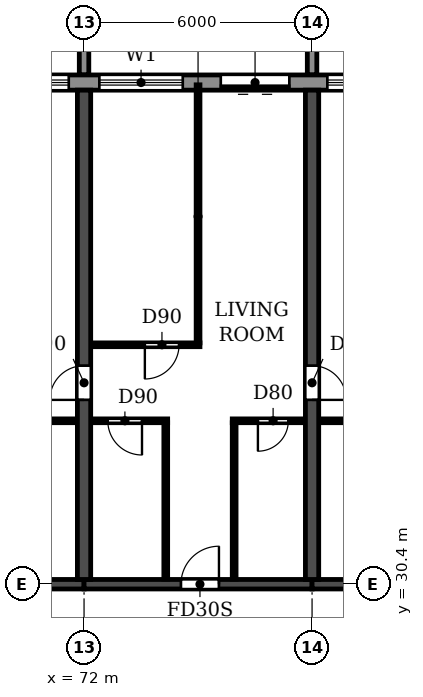
"""IFC4 building model, lengths in metres.
Left out: names, types, materials, properties, quantities, classifications, styles, units other than length and angle.
Written with IfcOpenShell. Run it as: python <this file> out.ifc"""

import sys

from ifc_helpers import new_model, si_unit, direction, frame, frame_2d, origin, place, context, subcontext, project, spatial, polyline, rectangle, outline, extrude, source, transform, mapped, element, fill, save


model = new_model("IFC4")
c1 = context("Model", 3, precision=1e-05, world=origin(), true_north=direction((0.0, 1.0)))
c2 = subcontext(c1, "Body", "Model", "MODEL_VIEW")
j1 = project(units=[si_unit("LENGTHUNIT", "METRE"), si_unit("PLANEANGLEUNIT", "RADIAN")], contexts=[c1])
p1 = place(None, origin())
s1 = spatial("IfcSite", under=j1, at=p1, CompositionType="ELEMENT")
p2 = place(p1, origin())
s2 = spatial("IfcBuilding", under=s1, at=p2, CompositionType="ELEMENT")
p3 = place(p2, frame((0.0, 0.0, 82.8)))
s3 = spatial("IfcBuildingStorey", under=s2, at=p3, CompositionType="ELEMENT", Elevation=82.8)
p4 = place(p3, frame((72.0, 30.525, 0.0), z_axis=(0.0, 0.0, 1.0), x_axis=(0.0, 1.0, 0.0)))
e1 = element("IfcWall", 1, at=p4, inside=s3, PredefinedType="SHEAR", context=c2, shape_type="SweptSolid", body=[
    extrude(rectangle(XDim=12.875, YDim=0.35, at=frame_2d((6.438, 0.0))), origin(), (0.0, 0.0, 1.0), 3.06),
])
p5 = place(p4, frame((4.725, 0.0, 0.0)))
e2 = element("IfcOpeningElement", 2, at=p5, cuts=e1, PredefinedType="OPENING", context=c2, shape_type="SweptSolid", body=[
    extrude(rectangle(XDim=0.9, YDim=2.1, at=frame_2d((0.45, 1.05))), frame((0.0, 0.185, 0.0), z_axis=(0.0, -1.0, 0.0), x_axis=(1.0, 0.0, 0.0)), (0.0, 0.0, 1.0), 0.37),
])
p6 = place(p3, frame((78.0, 30.525, 0.0), z_axis=(0.0, 0.0, 1.0), x_axis=(0.0, 1.0, 0.0)))
e3 = element("IfcWall", 3, at=p6, inside=s3, PredefinedType="SHEAR", context=c2, shape_type="SweptSolid", body=[
    extrude(rectangle(XDim=12.875, YDim=0.35, at=frame_2d((6.438, 0.0))), origin(), (0.0, 0.0, 1.0), 3.06),
])
p7 = place(p6, frame((4.725, 0.0, 0.0)))
e4 = element("IfcOpeningElement", 4, at=p7, cuts=e3, PredefinedType="OPENING", context=c2, shape_type="SweptSolid", body=[
    extrude(rectangle(XDim=0.9, YDim=2.1, at=frame_2d((0.45, 1.05))), frame((0.0, 0.185, 0.0), z_axis=(0.0, -1.0, 0.0), x_axis=(1.0, 0.0, 0.0)), (0.0, 0.0, 1.0), 0.37),
])
p8 = place(p3, frame((66.0, 30.4, 0.0), z_axis=(0.0, 0.0, 1.0), x_axis=(1.0, 0.0, 0.0)))
e5 = element("IfcWall", 5, at=p8, inside=s3, PredefinedType="SHEAR", context=c2, shape_type="SweptSolid", body=[
    extrude(rectangle(XDim=6.0, YDim=0.25, at=frame_2d((3.0, 0.0))), origin(), (0.0, 0.0, 1.0), 2.46),
])
p9 = place(p3, frame((72.0, 30.4, 0.0), z_axis=(0.0, 0.0, 1.0), x_axis=(1.0, 0.0, 0.0)))
e6 = element("IfcWall", 6, at=p9, inside=s3, PredefinedType="SHEAR", context=c2, shape_type="SweptSolid", body=[
    extrude(rectangle(XDim=6.0, YDim=0.25, at=frame_2d((3.0, 0.0))), origin(), (0.0, 0.0, 1.0), 2.46),
])
p10 = place(p9, frame((2.55, 0.0, 0.0)))
e7 = element("IfcOpeningElement", 7, at=p10, cuts=e6, PredefinedType="OPENING", context=c2, shape_type="SweptSolid", body=[
    extrude(rectangle(XDim=1.0, YDim=2.1, at=frame_2d((0.5, 1.05))), frame((0.0, 0.135, 0.0), z_axis=(0.0, -1.0, 0.0), x_axis=(1.0, 0.0, 0.0)), (0.0, 0.0, 1.0), 0.27),
])
p11 = place(p3, frame((78.0, 30.4, 0.0), z_axis=(0.0, 0.0, 1.0), x_axis=(1.0, 0.0, 0.0)))
e8 = element("IfcWall", 8, at=p11, inside=s3, PredefinedType="SHEAR", context=c2, shape_type="SweptSolid", body=[
    extrude(rectangle(XDim=6.0, YDim=0.25, at=frame_2d((3.0, 0.0))), origin(), (0.0, 0.0, 1.0), 2.46),
])
p12 = place(p3, frame((91.317, 43.6, 0.0), z_axis=(0.0, 0.0, 1.0), x_axis=(-1.0, 0.0, 0.0)))
e9 = element("IfcWall", 9, at=p12, inside=s3, PredefinedType="STANDARD", context=c2, shape_type="SweptSolid", body=[
    extrude(rectangle(XDim=80.634, YDim=0.4, at=frame_2d((40.317, 0.0))), origin(), (0.0, 0.0, 1.0), 3.06),
])
p13 = place(p12, frame((76.717, 0.0, 0.9)))
e10 = element("IfcOpeningElement", 10, at=p13, cuts=e9, PredefinedType="OPENING", context=c2, shape_type="SweptSolid", body=[
    extrude(rectangle(XDim=2.2, YDim=1.5, at=frame_2d((1.1, 0.75))), frame((0.0, 0.21, 0.0), z_axis=(0.0, -1.0, 0.0), x_axis=(1.0, 0.0, 0.0)), (0.0, 0.0, 1.0), 0.42),
])
p14 = place(p12, frame((73.917, 0.0, 0.0)))
e11 = element("IfcOpeningElement", 11, at=p14, cuts=e9, PredefinedType="OPENING", context=c2, shape_type="SweptSolid", body=[
    extrude(rectangle(XDim=1.8, YDim=2.4, at=frame_2d((0.9, 1.2))), frame((0.0, 0.21, 0.0), z_axis=(0.0, -1.0, 0.0), x_axis=(1.0, 0.0, 0.0)), (0.0, 0.0, 1.0), 0.42),
])
p15 = place(p12, frame((70.717, 0.0, 0.9)))
e12 = element("IfcOpeningElement", 12, at=p15, cuts=e9, PredefinedType="OPENING", context=c2, shape_type="SweptSolid", body=[
    extrude(rectangle(XDim=2.2, YDim=1.5, at=frame_2d((1.1, 0.75))), frame((0.0, 0.21, 0.0), z_axis=(0.0, -1.0, 0.0), x_axis=(1.0, 0.0, 0.0)), (0.0, 0.0, 1.0), 0.42),
])
p16 = place(p12, frame((67.717, 0.0, 0.9)))
e13 = element("IfcOpeningElement", 13, at=p16, cuts=e9, PredefinedType="OPENING", context=c2, shape_type="SweptSolid", body=[
    extrude(rectangle(XDim=2.2, YDim=1.5, at=frame_2d((1.1, 0.75))), frame((0.0, 0.21, 0.0), z_axis=(0.0, -1.0, 0.0), x_axis=(1.0, 0.0, 0.0)), (0.0, 0.0, 1.0), 0.42),
])
p17 = place(p12, frame((64.717, 0.0, 0.9)))
e14 = element("IfcOpeningElement", 14, at=p17, cuts=e9, PredefinedType="OPENING", context=c2, shape_type="SweptSolid", body=[
    extrude(rectangle(XDim=2.2, YDim=1.5, at=frame_2d((1.1, 0.75))), frame((0.0, 0.21, 0.0), z_axis=(0.0, -1.0, 0.0), x_axis=(1.0, 0.0, 0.0)), (0.0, 0.0, 1.0), 0.42),
])
p18 = place(p12, frame((61.917, 0.0, 0.0)))
e15 = element("IfcOpeningElement", 15, at=p18, cuts=e9, PredefinedType="OPENING", context=c2, shape_type="SweptSolid", body=[
    extrude(rectangle(XDim=1.8, YDim=2.4, at=frame_2d((0.9, 1.2))), frame((0.0, 0.21, 0.0), z_axis=(0.0, -1.0, 0.0), x_axis=(1.0, 0.0, 0.0)), (0.0, 0.0, 1.0), 0.42),
])
p19 = place(p12, frame((58.917, 0.0, 0.0)))
e16 = element("IfcOpeningElement", 16, at=p19, cuts=e9, PredefinedType="OPENING", context=c2, shape_type="SweptSolid", body=[
    extrude(rectangle(XDim=1.8, YDim=2.4, at=frame_2d((0.9, 1.2))), frame((0.0, 0.21, 0.0), z_axis=(0.0, -1.0, 0.0), x_axis=(1.0, 0.0, 0.0)), (0.0, 0.0, 1.0), 0.42),
])
p20 = place(p12, frame((55.717, 0.0, 0.9)))
e17 = element("IfcOpeningElement", 17, at=p20, cuts=e9, PredefinedType="OPENING", context=c2, shape_type="SweptSolid", body=[
    extrude(rectangle(XDim=2.2, YDim=1.5, at=frame_2d((1.1, 0.75))), frame((0.0, 0.21, 0.0), z_axis=(0.0, -1.0, 0.0), x_axis=(1.0, 0.0, 0.0)), (0.0, 0.0, 1.0), 0.42),
])
p21 = place(p12, frame((52.717, 0.0, 0.9)))
e18 = element("IfcOpeningElement", 18, at=p21, cuts=e9, PredefinedType="OPENING", context=c2, shape_type="SweptSolid", body=[
    extrude(rectangle(XDim=2.2, YDim=1.5, at=frame_2d((1.1, 0.75))), frame((0.0, 0.21, 0.0), z_axis=(0.0, -1.0, 0.0), x_axis=(1.0, 0.0, 0.0)), (0.0, 0.0, 1.0), 0.42),
])
p22 = place(p12, frame((49.917, 0.0, 0.0)))
e19 = element("IfcOpeningElement", 19, at=p22, cuts=e9, PredefinedType="OPENING", context=c2, shape_type="SweptSolid", body=[
    extrude(rectangle(XDim=1.8, YDim=2.4, at=frame_2d((0.9, 1.2))), frame((0.0, 0.21, 0.0), z_axis=(0.0, -1.0, 0.0), x_axis=(1.0, 0.0, 0.0)), (0.0, 0.0, 1.0), 0.42),
])
p23 = place(p12, frame((46.717, 0.0, 0.9)))
e20 = element("IfcOpeningElement", 20, at=p23, cuts=e9, PredefinedType="OPENING", context=c2, shape_type="SweptSolid", body=[
    extrude(rectangle(XDim=2.2, YDim=1.5, at=frame_2d((1.1, 0.75))), frame((0.0, 0.21, 0.0), z_axis=(0.0, -1.0, 0.0), x_axis=(1.0, 0.0, 0.0)), (0.0, 0.0, 1.0), 0.42),
])
p24 = place(p12, frame((43.717, 0.0, 0.9)))
e21 = element("IfcOpeningElement", 21, at=p24, cuts=e9, PredefinedType="OPENING", context=c2, shape_type="SweptSolid", body=[
    extrude(rectangle(XDim=2.2, YDim=1.5, at=frame_2d((1.1, 0.75))), frame((0.0, 0.21, 0.0), z_axis=(0.0, -1.0, 0.0), x_axis=(1.0, 0.0, 0.0)), (0.0, 0.0, 1.0), 0.42),
])
p25 = place(p12, frame((40.717, 0.0, 0.9)))
e22 = element("IfcOpeningElement", 22, at=p25, cuts=e9, PredefinedType="OPENING", context=c2, shape_type="SweptSolid", body=[
    extrude(rectangle(XDim=2.2, YDim=1.5, at=frame_2d((1.1, 0.75))), frame((0.0, 0.21, 0.0), z_axis=(0.0, -1.0, 0.0), x_axis=(1.0, 0.0, 0.0)), (0.0, 0.0, 1.0), 0.42),
])
p26 = place(p12, frame((37.917, 0.0, 0.0)))
e23 = element("IfcOpeningElement", 23, at=p26, cuts=e9, PredefinedType="OPENING", context=c2, shape_type="SweptSolid", body=[
    extrude(rectangle(XDim=1.8, YDim=2.4, at=frame_2d((0.9, 1.2))), frame((0.0, 0.21, 0.0), z_axis=(0.0, -1.0, 0.0), x_axis=(1.0, 0.0, 0.0)), (0.0, 0.0, 1.0), 0.42),
])
p27 = place(p12, frame((34.717, 0.0, 0.9)))
e24 = element("IfcOpeningElement", 24, at=p27, cuts=e9, PredefinedType="OPENING", context=c2, shape_type="SweptSolid", body=[
    extrude(rectangle(XDim=2.2, YDim=1.5, at=frame_2d((1.1, 0.75))), frame((0.0, 0.21, 0.0), z_axis=(0.0, -1.0, 0.0), x_axis=(1.0, 0.0, 0.0)), (0.0, 0.0, 1.0), 0.42),
])
p28 = place(p12, frame((31.717, 0.0, 0.9)))
e25 = element("IfcOpeningElement", 25, at=p28, cuts=e9, PredefinedType="OPENING", context=c2, shape_type="SweptSolid", body=[
    extrude(rectangle(XDim=2.2, YDim=1.5, at=frame_2d((1.1, 0.75))), frame((0.0, 0.21, 0.0), z_axis=(0.0, -1.0, 0.0), x_axis=(1.0, 0.0, 0.0)), (0.0, 0.0, 1.0), 0.42),
])
p29 = place(p12, frame((28.917, 0.0, 0.0)))
e26 = element("IfcOpeningElement", 26, at=p29, cuts=e9, PredefinedType="OPENING", context=c2, shape_type="SweptSolid", body=[
    extrude(rectangle(XDim=1.8, YDim=2.4, at=frame_2d((0.9, 1.2))), frame((0.0, 0.21, 0.0), z_axis=(0.0, -1.0, 0.0), x_axis=(1.0, 0.0, 0.0)), (0.0, 0.0, 1.0), 0.42),
])
p30 = place(p12, frame((25.717, 0.0, 0.9)))
e27 = element("IfcOpeningElement", 27, at=p30, cuts=e9, PredefinedType="OPENING", context=c2, shape_type="SweptSolid", body=[
    extrude(rectangle(XDim=2.2, YDim=1.5, at=frame_2d((1.1, 0.75))), frame((0.0, 0.21, 0.0), z_axis=(0.0, -1.0, 0.0), x_axis=(1.0, 0.0, 0.0)), (0.0, 0.0, 1.0), 0.42),
])
p31 = place(p12, frame((22.717, 0.0, 0.9)))
e28 = element("IfcOpeningElement", 28, at=p31, cuts=e9, PredefinedType="OPENING", context=c2, shape_type="SweptSolid", body=[
    extrude(rectangle(XDim=2.2, YDim=1.5, at=frame_2d((1.1, 0.75))), frame((0.0, 0.21, 0.0), z_axis=(0.0, -1.0, 0.0), x_axis=(1.0, 0.0, 0.0)), (0.0, 0.0, 1.0), 0.42),
])
p32 = place(p12, frame((19.717, 0.0, 0.9)))
e29 = element("IfcOpeningElement", 29, at=p32, cuts=e9, PredefinedType="OPENING", context=c2, shape_type="SweptSolid", body=[
    extrude(rectangle(XDim=2.2, YDim=1.5, at=frame_2d((1.1, 0.75))), frame((0.0, 0.21, 0.0), z_axis=(0.0, -1.0, 0.0), x_axis=(1.0, 0.0, 0.0)), (0.0, 0.0, 1.0), 0.42),
])
p33 = place(p12, frame((16.717, 0.0, 0.9)))
e30 = element("IfcOpeningElement", 30, at=p33, cuts=e9, PredefinedType="OPENING", context=c2, shape_type="SweptSolid", body=[
    extrude(rectangle(XDim=2.2, YDim=1.5, at=frame_2d((1.1, 0.75))), frame((0.0, 0.21, 0.0), z_axis=(0.0, -1.0, 0.0), x_axis=(1.0, 0.0, 0.0)), (0.0, 0.0, 1.0), 0.42),
])
p34 = place(p12, frame((13.917, 0.0, 0.0)))
e31 = element("IfcOpeningElement", 31, at=p34, cuts=e9, PredefinedType="OPENING", context=c2, shape_type="SweptSolid", body=[
    extrude(rectangle(XDim=1.8, YDim=2.4, at=frame_2d((0.9, 1.2))), frame((0.0, 0.21, 0.0), z_axis=(0.0, -1.0, 0.0), x_axis=(1.0, 0.0, 0.0)), (0.0, 0.0, 1.0), 0.42),
])
p35 = place(p12, frame((10.717, 0.0, 0.9)))
e32 = element("IfcOpeningElement", 32, at=p35, cuts=e9, PredefinedType="OPENING", context=c2, shape_type="SweptSolid", body=[
    extrude(rectangle(XDim=2.2, YDim=1.5, at=frame_2d((1.1, 0.75))), frame((0.0, 0.21, 0.0), z_axis=(0.0, -1.0, 0.0), x_axis=(1.0, 0.0, 0.0)), (0.0, 0.0, 1.0), 0.42),
])
p36 = place(p12, frame((7.717, 0.0, 0.9)))
e33 = element("IfcOpeningElement", 33, at=p36, cuts=e9, PredefinedType="OPENING", context=c2, shape_type="SweptSolid", body=[
    extrude(rectangle(XDim=2.2, YDim=1.5, at=frame_2d((1.1, 0.75))), frame((0.0, 0.21, 0.0), z_axis=(0.0, -1.0, 0.0), x_axis=(1.0, 0.0, 0.0)), (0.0, 0.0, 1.0), 0.42),
])
p37 = place(p12, frame((4.917, 0.0, 0.0)))
e34 = element("IfcOpeningElement", 34, at=p37, cuts=e9, PredefinedType="OPENING", context=c2, shape_type="SweptSolid", body=[
    extrude(rectangle(XDim=1.8, YDim=2.4, at=frame_2d((0.9, 1.2))), frame((0.0, 0.21, 0.0), z_axis=(0.0, -1.0, 0.0), x_axis=(1.0, 0.0, 0.0)), (0.0, 0.0, 1.0), 0.42),
])
p38 = place(p12, frame((1.717, 0.0, 0.9)))
e35 = element("IfcOpeningElement", 35, at=p38, cuts=e9, PredefinedType="OPENING", context=c2, shape_type="SweptSolid", body=[
    extrude(rectangle(XDim=2.2, YDim=1.5, at=frame_2d((1.1, 0.75))), frame((0.0, 0.21, 0.0), z_axis=(0.0, -1.0, 0.0), x_axis=(1.0, 0.0, 0.0)), (0.0, 0.0, 1.0), 0.42),
])
m1 = source(origin(), c2, "Body", "SweptSolid", [
    extrude(outline(polyline([(0.0, 0.0), (0.25, 0.0), (0.25, 3.1), (0.0, 3.1), (0.0, 0.0)])), origin(), (0.0, 0.0, 1.0), 3.1),
])
for number, where in (
    (36, (71.875, 43.8, 0.0)),
    (37, (77.875, 43.8, 0.0)),
):
    element("IfcWall", number, at=place(p3, frame(where)), inside=s3, PredefinedType="STANDARD", context=c2, shape_type="MappedRepresentation", body=[
        mapped(m1, transform((0.0, 0.0, 0.0))),
    ])
p39 = place(p3, frame((68.9, 34.7, 0.0), z_axis=(0.0, 0.0, 1.0), x_axis=(1.0, 0.0, 0.0)))
e38 = element("IfcWall", 38, at=p39, inside=s3, PredefinedType="PARTITIONING", context=c2, shape_type="SweptSolid", body=[
    extrude(rectangle(XDim=2.915, YDim=0.1, at=frame_2d((1.458, 0.0))), origin(), (0.0, 0.0, 1.0), 3.06),
])
p40 = place(p39, frame((1.2, 0.0, 0.0)))
e39 = element("IfcOpeningElement", 39, at=p40, cuts=e38, PredefinedType="OPENING", context=c2, shape_type="SweptSolid", body=[
    extrude(rectangle(XDim=0.8, YDim=2.1, at=frame_2d((0.4, 1.05))), frame((0.0, 0.06, 0.0), z_axis=(0.0, -1.0, 0.0), x_axis=(1.0, 0.0, 0.0)), (0.0, 0.0, 1.0), 0.12),
])
p41 = place(p3, frame((72.185, 34.7, 0.0), z_axis=(0.0, 0.0, 1.0), x_axis=(1.0, 0.0, 0.0)))
e40 = element("IfcWall", 40, at=p41, inside=s3, PredefinedType="PARTITIONING", context=c2, shape_type="SweptSolid", body=[
    extrude(rectangle(XDim=2.015, YDim=0.1, at=frame_2d((1.007, 0.0))), origin(), (0.0, 0.0, 1.0), 3.06),
])
p42 = place(p41, frame((0.44, 0.0, 0.0)))
e41 = element("IfcOpeningElement", 41, at=p42, cuts=e40, PredefinedType="OPENING", context=c2, shape_type="SweptSolid", body=[
    extrude(rectangle(XDim=0.9, YDim=2.1, at=frame_2d((0.45, 1.05))), frame((0.0, 0.06, 0.0), z_axis=(0.0, -1.0, 0.0), x_axis=(1.0, 0.0, 0.0)), (0.0, 0.0, 1.0), 0.12),
])
p43 = place(p3, frame((75.9, 34.7, 0.0), z_axis=(0.0, 0.0, 1.0), x_axis=(1.0, 0.0, 0.0)))
e42 = element("IfcWall", 42, at=p43, inside=s3, PredefinedType="PARTITIONING", context=c2, shape_type="SweptSolid", body=[
    extrude(rectangle(XDim=1.915, YDim=0.1, at=frame_2d((0.958, 0.0))), origin(), (0.0, 0.0, 1.0), 3.06),
])
p44 = place(p43, frame((0.675, 0.0, 0.0)))
e43 = element("IfcOpeningElement", 43, at=p44, cuts=e42, PredefinedType="OPENING", context=c2, shape_type="SweptSolid", body=[
    extrude(rectangle(XDim=0.8, YDim=2.1, at=frame_2d((0.4, 1.05))), frame((0.0, 0.06, 0.0), z_axis=(0.0, -1.0, 0.0), x_axis=(1.0, 0.0, 0.0)), (0.0, 0.0, 1.0), 0.12),
])
p45 = place(p3, frame((78.185, 34.7, 0.0), z_axis=(0.0, 0.0, 1.0), x_axis=(1.0, 0.0, 0.0)))
e44 = element("IfcWall", 44, at=p45, inside=s3, PredefinedType="PARTITIONING", context=c2, shape_type="SweptSolid", body=[
    extrude(rectangle(XDim=2.715, YDim=0.1, at=frame_2d((1.357, 0.0))), origin(), (0.0, 0.0, 1.0), 3.06),
])
p46 = place(p45, frame((0.915, 0.0, 0.0)))
e45 = element("IfcOpeningElement", 45, at=p46, cuts=e44, PredefinedType="OPENING", context=c2, shape_type="SweptSolid", body=[
    extrude(rectangle(XDim=0.8, YDim=2.1, at=frame_2d((0.4, 1.05))), frame((0.0, 0.06, 0.0), z_axis=(0.0, -1.0, 0.0), x_axis=(1.0, 0.0, 0.0)), (0.0, 0.0, 1.0), 0.12),
])
p47 = place(p3, frame((72.185, 36.7, 0.0), z_axis=(0.0, 0.0, 1.0), x_axis=(1.0, 0.0, 0.0)))
e46 = element("IfcWall", 46, at=p47, inside=s3, PredefinedType="PARTITIONING", context=c2, shape_type="SweptSolid", body=[
    extrude(rectangle(XDim=2.865, YDim=0.1, at=frame_2d((1.433, 0.0))), origin(), (0.0, 0.0, 1.0), 3.06),
])
p48 = place(p47, frame((1.415, 0.0, 0.0)))
e47 = element("IfcOpeningElement", 47, at=p48, cuts=e46, PredefinedType="OPENING", context=c2, shape_type="SweptSolid", body=[
    extrude(rectangle(XDim=0.9, YDim=2.1, at=frame_2d((0.45, 1.05))), frame((0.0, 0.06, 0.0), z_axis=(0.0, -1.0, 0.0), x_axis=(1.0, 0.0, 0.0)), (0.0, 0.0, 1.0), 0.12),
])
p49 = place(p3, frame((74.15, 30.535, 0.0), z_axis=(0.0, 0.0, 1.0), x_axis=(0.0, 1.0, 0.0)))
e48 = element("IfcWall", 48, at=p49, inside=s3, PredefinedType="PARTITIONING", context=c2, shape_type="SweptSolid", body=[
    extrude(rectangle(XDim=4.115, YDim=0.1, at=frame_2d((2.058, 0.0))), origin(), (0.0, 0.0, 1.0), 3.06),
])
p50 = place(p3, frame((75.0, 36.75, 0.0), z_axis=(0.0, 0.0, 1.0), x_axis=(0.0, 1.0, 0.0)))
e49 = element("IfcWall", 49, at=p50, inside=s3, PredefinedType="PARTITIONING", context=c2, shape_type="SweptSolid", body=[
    extrude(rectangle(XDim=6.79, YDim=0.1, at=frame_2d((3.395, 0.0))), origin(), (0.0, 0.0, 1.0), 3.06),
])
p51 = place(p3, frame((75.95, 30.535, 0.0), z_axis=(0.0, 0.0, 1.0), x_axis=(0.0, 1.0, 0.0)))
e50 = element("IfcWall", 50, at=p51, inside=s3, PredefinedType="PARTITIONING", context=c2, shape_type="SweptSolid", body=[
    extrude(rectangle(XDim=4.115, YDim=0.1, at=frame_2d((2.058, 0.0))), origin(), (0.0, 0.0, 1.0), 3.06),
])
p52 = place(p32, origin())
e51 = element("IfcWindow", 51, at=p52, inside=s3, PartitioningType="DOUBLE_PANEL_HORIZONTAL", PredefinedType="WINDOW", context=c2, shape_type="SweptSolid", body=[
    extrude(rectangle(XDim=2.2, YDim=1.5, at=frame_2d((1.1, 0.75))), frame((0.0, 0.03, 0.0), z_axis=(0.0, -1.0, 0.0), x_axis=(1.0, 0.0, 0.0)), (0.0, 0.0, 1.0), 0.06),
])
fill(e29, e51)
p53 = place(p33, origin())
e52 = element("IfcWindow", 52, at=p53, inside=s3, PartitioningType="DOUBLE_PANEL_HORIZONTAL", PredefinedType="WINDOW", context=c2, shape_type="SweptSolid", body=[
    extrude(rectangle(XDim=2.2, YDim=1.5, at=frame_2d((1.1, 0.75))), frame((0.0, 0.03, 0.0), z_axis=(0.0, -1.0, 0.0), x_axis=(1.0, 0.0, 0.0)), (0.0, 0.0, 1.0), 0.06),
])
fill(e30, e52)
p54 = place(p34, origin())
e53 = element("IfcDoor", 53, at=p54, inside=s3, OperationType="DOUBLE_DOOR_SLIDING", PredefinedType="DOOR", context=c2, shape_type="SweptSolid", body=[
    extrude(rectangle(XDim=1.8, YDim=2.4, at=frame_2d((0.9, 1.2))), frame((0.0, 0.025, 0.0), z_axis=(0.0, -1.0, 0.0), x_axis=(1.0, 0.0, 0.0)), (0.0, 0.0, 1.0), 0.05),
])
fill(e31, e53)
p55 = place(p35, origin())
e54 = element("IfcWindow", 54, at=p55, inside=s3, PartitioningType="DOUBLE_PANEL_HORIZONTAL", PredefinedType="WINDOW", context=c2, shape_type="SweptSolid", body=[
    extrude(rectangle(XDim=2.2, YDim=1.5, at=frame_2d((1.1, 0.75))), frame((0.0, 0.03, 0.0), z_axis=(0.0, -1.0, 0.0), x_axis=(1.0, 0.0, 0.0)), (0.0, 0.0, 1.0), 0.06),
])
fill(e32, e54)
p56 = place(p5, origin())
e55 = element("IfcDoor", 55, at=p56, inside=s3, OperationType="SINGLE_SWING_LEFT", PredefinedType="DOOR", context=c2, shape_type="SweptSolid", body=[
    extrude(rectangle(XDim=0.9, YDim=2.1, at=frame_2d((0.45, 1.05))), frame((0.0, 0.025, 0.0), z_axis=(0.0, -1.0, 0.0), x_axis=(1.0, 0.0, 0.0)), (0.0, 0.0, 1.0), 0.05),
])
fill(e2, e55)
p57 = place(p42, frame((0.9, 0.0, 0.0), z_axis=(0.0, 0.0, 1.0), x_axis=(-1.0, 0.0, 0.0)))
e56 = element("IfcDoor", 56, at=p57, inside=s3, OperationType="SINGLE_SWING_LEFT", PredefinedType="DOOR", context=c2, shape_type="SweptSolid", body=[
    extrude(rectangle(XDim=0.9, YDim=2.1, at=frame_2d((0.45, 1.05))), frame((0.0, 0.025, 0.0), z_axis=(0.0, -1.0, 0.0), x_axis=(1.0, 0.0, 0.0)), (0.0, 0.0, 1.0), 0.05),
])
fill(e41, e56)
p58 = place(p48, frame((0.9, 0.0, 0.0), z_axis=(0.0, 0.0, 1.0), x_axis=(-1.0, 0.0, 0.0)))
e57 = element("IfcDoor", 57, at=p58, inside=s3, OperationType="SINGLE_SWING_RIGHT", PredefinedType="DOOR", context=c2, shape_type="SweptSolid", body=[
    extrude(rectangle(XDim=0.9, YDim=2.1, at=frame_2d((0.45, 1.05))), frame((0.0, 0.025, 0.0), z_axis=(0.0, -1.0, 0.0), x_axis=(1.0, 0.0, 0.0)), (0.0, 0.0, 1.0), 0.05),
])
fill(e47, e57)
p59 = place(p10, origin())
e58 = element("IfcDoor", 58, at=p59, inside=s3, OperationType="SINGLE_SWING_RIGHT", PredefinedType="DOOR", context=c2, shape_type="SweptSolid", body=[
    extrude(rectangle(XDim=1.0, YDim=2.1, at=frame_2d((0.5, 1.05))), frame((0.0, 0.025, 0.0), z_axis=(0.0, -1.0, 0.0), x_axis=(1.0, 0.0, 0.0)), (0.0, 0.0, 1.0), 0.05),
])
fill(e7, e58)
p60 = place(p44, frame((0.8, 0.0, 0.0), z_axis=(0.0, 0.0, 1.0), x_axis=(-1.0, 0.0, 0.0)))
e59 = element("IfcDoor", 59, at=p60, inside=s3, OperationType="SINGLE_SWING_RIGHT", PredefinedType="DOOR", context=c2, shape_type="SweptSolid", body=[
    extrude(rectangle(XDim=0.8, YDim=2.1, at=frame_2d((0.4, 1.05))), frame((0.0, 0.025, 0.0), z_axis=(0.0, -1.0, 0.0), x_axis=(1.0, 0.0, 0.0)), (0.0, 0.0, 1.0), 0.05),
])
fill(e43, e59)
p61 = place(p7, frame((0.9, 0.0, 0.0), z_axis=(0.0, 0.0, 1.0), x_axis=(-1.0, 0.0, 0.0)))
e60 = element("IfcDoor", 60, at=p61, inside=s3, OperationType="SINGLE_SWING_RIGHT", PredefinedType="DOOR", context=c2, shape_type="SweptSolid", body=[
    extrude(rectangle(XDim=0.9, YDim=2.1, at=frame_2d((0.45, 1.05))), frame((0.0, 0.025, 0.0), z_axis=(0.0, -1.0, 0.0), x_axis=(1.0, 0.0, 0.0)), (0.0, 0.0, 1.0), 0.05),
])
fill(e4, e60)
save(model, sys.argv[1])
